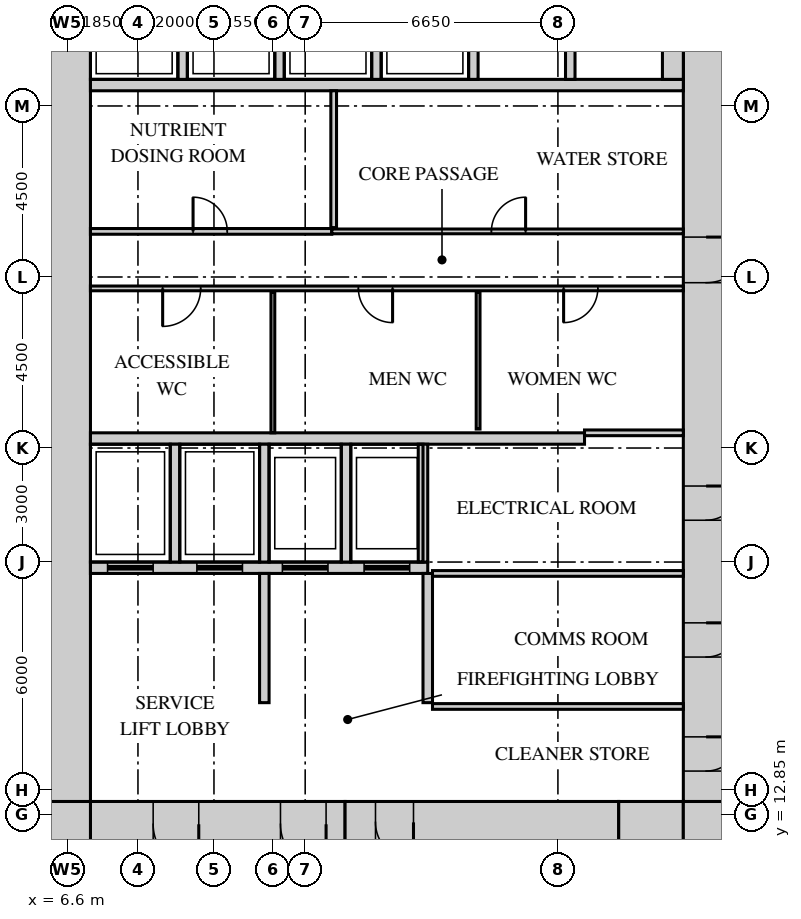
"""IFC4 building model, lengths in metres.
Left out: names, types, materials, properties, quantities, classifications, styles, units other than length and angle.
Written with IfcOpenShell. Run it as: python <this file> out.ifc"""

import sys

from ifc_helpers import new_model, si_unit, direction, frame, frame_2d, origin, place, context, subcontext, project, spatial, rectangle, extrude, source, transform, mapped, element, fill, save


model = new_model("IFC4")
c1 = context("Model", 3, precision=1e-05, world=origin(), true_north=direction((0.0, 1.0)))
c2 = subcontext(c1, "Body", "Model", "MODEL_VIEW")
j1 = project(units=[si_unit("LENGTHUNIT", "METRE"), si_unit("PLANEANGLEUNIT", "RADIAN")], contexts=[c1])
p1 = place(None, origin())
s1 = spatial("IfcSite", under=j1, at=p1, CompositionType="ELEMENT")
p2 = place(p1, origin())
s2 = spatial("IfcBuilding", under=s1, at=p2, CompositionType="ELEMENT")
p3 = place(p2, frame((0.0, 0.0, 28.5)))
s3 = spatial("IfcBuildingStorey", under=s2, at=p3, CompositionType="ELEMENT", Elevation=28.5)
m1 = source(origin(), c2, "Body", "SweptSolid", [
    extrude(rectangle(XDim=6.7, YDim=1.2, at=frame_2d((3.35, 0.0))), origin(), (0.0, 0.0, 1.0), 4.0),
])
p4 = place(p3, frame((7.2, 12.6, 0.0), z_axis=(0.0, 0.0, 1.0), x_axis=(1.0, 0.0, 0.0)))
e1 = element("IfcWall", 1, at=p4, inside=s3, PredefinedType="SHEAR", context=c2, shape_type="MappedRepresentation", body=[
    mapped(m1, transform((0.0, 0.0, 0.0))),
])
m2 = source(origin(), c2, "Body", "SweptSolid", [
    extrude(rectangle(XDim=1.2, YDim=2.1, at=frame_2d((0.6, 1.05))), frame((0.0, 0.61, 0.0), z_axis=(0.0, -1.0, 0.0), x_axis=(1.0, 0.0, 0.0)), (0.0, 0.0, 1.0), 1.22),
])
p5 = place(p4, frame((5.0, 0.0, 0.0)))
e2 = element("IfcOpeningElement", 2, at=p5, cuts=e1, PredefinedType="OPENING", context=c2, shape_type="MappedRepresentation", body=[
    mapped(m2, transform((0.0, 0.0, 0.0))),
])
p6 = place(p4, frame((1.65, 0.0, 0.0)))
e3 = element("IfcOpeningElement", 3, at=p6, cuts=e1, PredefinedType="OPENING", context=c2, shape_type="MappedRepresentation", body=[
    mapped(m2, transform((0.0, 0.0, 0.0))),
])
m3 = source(origin(), c2, "Body", "SweptSolid", [
    extrude(rectangle(XDim=7.2, YDim=1.1, at=frame_2d((3.6, 0.0))), origin(), (0.0, 0.0, 1.0), 4.0),
])
p7 = place(p3, frame((13.9, 12.65, 0.0), z_axis=(0.0, 0.0, 1.0), x_axis=(1.0, 0.0, 0.0)))
e4 = element("IfcWall", 4, at=p7, inside=s3, PredefinedType="SHEAR", context=c2, shape_type="MappedRepresentation", body=[
    mapped(m3, transform((0.0, 0.0, 0.0))),
])
m4 = source(origin(), c2, "Body", "SweptSolid", [
    extrude(rectangle(XDim=1.0, YDim=2.1, at=frame_2d((0.5, 1.05))), frame((0.0, 0.56, 0.0), z_axis=(0.0, -1.0, 0.0), x_axis=(1.0, 0.0, 0.0)), (0.0, 0.0, 1.0), 1.12),
])
p8 = place(p7, frame((0.8, 0.0, 0.0)))
e5 = element("IfcOpeningElement", 5, at=p8, cuts=e4, PredefinedType="OPENING", context=c2, shape_type="MappedRepresentation", body=[
    mapped(m4, transform((0.0, 0.0, 0.0))),
])
m5 = source(origin(), c2, "Body", "SweptSolid", [
    extrude(rectangle(XDim=1.7, YDim=1.2, at=frame_2d((0.85, 0.0))), origin(), (0.0, 0.0, 1.0), 4.0),
])
p9 = place(p3, frame((21.1, 12.6, 0.0), z_axis=(0.0, 0.0, 1.0), x_axis=(1.0, 0.0, 0.0)))
e6 = element("IfcWall", 6, at=p9, inside=s3, PredefinedType="SHEAR", context=c2, shape_type="MappedRepresentation", body=[
    mapped(m5, transform((0.0, 0.0, 0.0))),
])
m6 = source(origin(), c2, "Body", "SweptSolid", [
    extrude(rectangle(XDim=1.2, YDim=1.2, at=frame_2d((0.6, 0.0))), origin(), (0.0, 0.0, 1.0), 4.0),
])
for number, where, z_axis, x_axis in (
    (7, (22.8, 12.6, 0.0), (0.0, 0.0, 1.0), (1.0, 0.0, 0.0)),
    (8, (6.0, 12.6, 0.0), (0.0, 0.0, 1.0), (1.0, 0.0, 0.0)),
):
    element("IfcWall", number, at=place(p3, frame(where, z_axis=z_axis, x_axis=x_axis)), inside=s3, PredefinedType="SHEAR", context=c2, shape_type="MappedRepresentation", body=[
        mapped(m6, transform((0.0, 0.0, 0.0))),
    ])
m7 = source(origin(), c2, "Body", "SweptSolid", [
    extrude(rectangle(XDim=27.6, YDim=1.2, at=frame_2d((13.8, 0.0))), origin(), (0.0, 0.0, 1.0), 4.0),
])
p10 = place(p3, frame((23.4, 13.2, 0.0), z_axis=(0.0, 0.0, 1.0), x_axis=(0.0, 1.0, 0.0)))
e9 = element("IfcWall", 9, at=p10, inside=s3, PredefinedType="SHEAR", context=c2, shape_type="MappedRepresentation", body=[
    mapped(m7, transform((0.0, 0.0, 0.0))),
])
m8 = source(origin(), c2, "Body", "SweptSolid", [
    extrude(rectangle(XDim=1.8, YDim=2.1, at=frame_2d((0.9, 1.05))), frame((0.0, 0.61, 0.0), z_axis=(0.0, -1.0, 0.0), x_axis=(1.0, 0.0, 0.0)), (0.0, 0.0, 1.0), 1.22),
])
p11 = place(p10, frame((22.4, 0.0, 0.0)))
e10 = element("IfcOpeningElement", 10, at=p11, cuts=e9, PredefinedType="OPENING", context=c2, shape_type="MappedRepresentation", body=[
    mapped(m8, transform((0.0, 0.0, 0.0))),
])
p12 = place(p10, frame((13.65, 0.0, 0.0)))
e11 = element("IfcOpeningElement", 11, at=p12, cuts=e9, PredefinedType="OPENING", context=c2, shape_type="MappedRepresentation", body=[
    mapped(m2, transform((0.0, 0.0, 0.0))),
])
m9 = source(origin(), c2, "Body", "SweptSolid", [
    extrude(rectangle(XDim=0.9, YDim=2.1, at=frame_2d((0.45, 1.05))), frame((0.0, 0.61, 0.0), z_axis=(0.0, -1.0, 0.0), x_axis=(1.0, 0.0, 0.0)), (0.0, 0.0, 1.0), 1.22),
])
p13 = place(p10, frame((0.8, 0.0, 0.0)))
e12 = element("IfcOpeningElement", 12, at=p13, cuts=e9, PredefinedType="OPENING", context=c2, shape_type="MappedRepresentation", body=[
    mapped(m9, transform((0.0, 0.0, 0.0))),
])
p14 = place(p10, frame((3.8, 0.0, 0.0)))
e13 = element("IfcOpeningElement", 13, at=p14, cuts=e9, PredefinedType="OPENING", context=c2, shape_type="MappedRepresentation", body=[
    mapped(m9, transform((0.0, 0.0, 0.0))),
])
p15 = place(p10, frame((7.4, 0.0, 0.0)))
e14 = element("IfcOpeningElement", 14, at=p15, cuts=e9, PredefinedType="OPENING", context=c2, shape_type="MappedRepresentation", body=[
    mapped(m9, transform((0.0, 0.0, 0.0))),
])
p16 = place(p3, frame((6.6, 13.2, 0.0), z_axis=(0.0, 0.0, 1.0), x_axis=(0.0, 1.0, 0.0)))
e15 = element("IfcWall", 15, at=p16, inside=s3, PredefinedType="SHEAR", context=c2, shape_type="MappedRepresentation", body=[
    mapped(m7, transform((0.0, 0.0, 0.0))),
])
m10 = source(origin(), c2, "Body", "SweptSolid", [
    extrude(rectangle(XDim=13.0, YDim=0.3, at=frame_2d((6.5, 0.0))), origin(), (0.0, 0.0, 1.0), 4.0),
])
p17 = place(p3, frame((7.2, 22.75, 0.0), z_axis=(0.0, 0.0, 1.0), x_axis=(1.0, 0.0, 0.0)))
e16 = element("IfcWall", 16, at=p17, inside=s3, PredefinedType="STANDARD", context=c2, shape_type="MappedRepresentation", body=[
    mapped(m10, transform((0.0, 0.0, 0.0))),
])
m11 = source(origin(), c2, "Body", "SweptSolid", [
    extrude(rectangle(XDim=8.875, YDim=0.3, at=frame_2d((4.438, 0.0))), origin(), (0.0, 0.0, 1.0), 4.0),
])
p18 = place(p3, frame((7.2, 19.35, 0.0), z_axis=(0.0, 0.0, 1.0), x_axis=(1.0, 0.0, 0.0)))
e17 = element("IfcWall", 17, at=p18, inside=s3, PredefinedType="STANDARD", context=c2, shape_type="MappedRepresentation", body=[
    mapped(m11, transform((0.0, 0.0, 0.0))),
])
m12 = source(origin(), c2, "Body", "SweptSolid", [
    extrude(rectangle(XDim=1.2, YDim=2.1, at=frame_2d((0.6, 1.05))), frame((0.0, 0.16, 0.0), z_axis=(0.0, -1.0, 0.0), x_axis=(1.0, 0.0, 0.0)), (0.0, 0.0, 1.0), 0.32),
])
p19 = place(p18, frame((0.45, 0.0, 0.0)))
e18 = element("IfcOpeningElement", 18, at=p19, cuts=e17, PredefinedType="OPENING", context=c2, shape_type="MappedRepresentation", body=[
    mapped(m12, transform((0.0, 0.0, 0.0))),
])
p20 = place(p18, frame((2.8, 0.0, 0.0)))
e19 = element("IfcOpeningElement", 19, at=p20, cuts=e17, PredefinedType="OPENING", context=c2, shape_type="MappedRepresentation", body=[
    mapped(m12, transform((0.0, 0.0, 0.0))),
])
p21 = place(p18, frame((5.05, 0.0, 0.0)))
e20 = element("IfcOpeningElement", 20, at=p21, cuts=e17, PredefinedType="OPENING", context=c2, shape_type="MappedRepresentation", body=[
    mapped(m12, transform((0.0, 0.0, 0.0))),
])
p22 = place(p18, frame((7.2, 0.0, 0.0)))
e21 = element("IfcOpeningElement", 21, at=p22, cuts=e17, PredefinedType="OPENING", context=c2, shape_type="MappedRepresentation", body=[
    mapped(m12, transform((0.0, 0.0, 0.0))),
])
m13 = source(origin(), c2, "Body", "SweptSolid", [
    extrude(rectangle(XDim=15.6, YDim=0.3, at=frame_2d((7.8, 0.0))), origin(), (0.0, 0.0, 1.0), 4.0),
])
p23 = place(p3, frame((7.2, 32.05, 0.0), z_axis=(0.0, 0.0, 1.0), x_axis=(1.0, 0.0, 0.0)))
e22 = element("IfcWall", 22, at=p23, inside=s3, PredefinedType="STANDARD", context=c2, shape_type="MappedRepresentation", body=[
    mapped(m13, transform((0.0, 0.0, 0.0))),
])
m14 = source(origin(), c2, "Body", "SweptSolid", [
    extrude(rectangle(XDim=3.1, YDim=0.25, at=frame_2d((1.55, 0.0))), origin(), (0.0, 0.0, 1.0), 4.0),
])
for number, where, z_axis, x_axis in (
    (23, (9.425, 19.5, 0.0), (0.0, 0.0, 1.0), (0.0, 1.0, 0.0)),
    (24, (11.775, 19.5, 0.0), (0.0, 0.0, 1.0), (0.0, 1.0, 0.0)),
    (25, (13.925, 19.5, 0.0), (0.0, 0.0, 1.0), (0.0, 1.0, 0.0)),
    (26, (15.95, 19.5, 0.0), (0.0, 0.0, 1.0), (0.0, 1.0, 0.0)),
):
    element("IfcWall", number, at=place(p3, frame(where, z_axis=z_axis, x_axis=x_axis)), inside=s3, PredefinedType="STANDARD", context=c2, shape_type="MappedRepresentation", body=[
        mapped(m14, transform((0.0, 0.0, 0.0))),
    ])
m15 = source(origin(), c2, "Body", "SweptSolid", [
    extrude(rectangle(XDim=2.4, YDim=0.25, at=frame_2d((1.2, 0.0))), origin(), (0.0, 0.0, 1.0), 4.0),
])
for number, where, z_axis, x_axis in (
    (27, (9.625, 32.2, 0.0), (0.0, 0.0, 1.0), (0.0, 1.0, 0.0)),
    (28, (12.175, 32.2, 0.0), (0.0, 0.0, 1.0), (0.0, 1.0, 0.0)),
    (29, (14.725, 32.2, 0.0), (0.0, 0.0, 1.0), (0.0, 1.0, 0.0)),
    (30, (17.275, 32.2, 0.0), (0.0, 0.0, 1.0), (0.0, 1.0, 0.0)),
    (31, (19.825, 32.2, 0.0), (0.0, 0.0, 1.0), (0.0, 1.0, 0.0)),
):
    element("IfcWall", number, at=place(p3, frame(where, z_axis=z_axis, x_axis=x_axis)), inside=s3, PredefinedType="STANDARD", context=c2, shape_type="MappedRepresentation", body=[
        mapped(m15, transform((0.0, 0.0, 0.0))),
    ])
m16 = source(origin(), c2, "Body", "SweptSolid", [
    extrude(rectangle(XDim=2.4, YDim=0.55, at=frame_2d((1.2, 0.0))), origin(), (0.0, 0.0, 1.0), 4.0),
])
p24 = place(p3, frame((22.525, 32.2, 0.0), z_axis=(0.0, 0.0, 1.0), x_axis=(0.0, 1.0, 0.0)))
e32 = element("IfcWall", 32, at=p24, inside=s3, PredefinedType="STANDARD", context=c2, shape_type="MappedRepresentation", body=[
    mapped(m16, transform((0.0, 0.0, 0.0))),
])
m17 = source(origin(), c2, "Body", "SweptSolid", [
    extrude(rectangle(XDim=3.4, YDim=0.25, at=frame_2d((1.7, 0.0))), origin(), (0.0, 0.0, 1.0), 4.0),
])
for number, where, z_axis, x_axis in (
    (33, (16.075, 15.8, 0.0), (0.0, 0.0, 1.0), (0.0, 1.0, 0.0)),
    (34, (11.775, 15.8, 0.0), (0.0, 0.0, 1.0), (0.0, 1.0, 0.0)),
):
    element("IfcWall", number, at=place(p3, frame(where, z_axis=z_axis, x_axis=x_axis)), inside=s3, PredefinedType="STANDARD", context=c2, shape_type="MappedRepresentation", body=[
        mapped(m17, transform((0.0, 0.0, 0.0))),
    ])
m18 = source(origin(), c2, "Body", "SweptSolid", [
    extrude(rectangle(XDim=6.6, YDim=0.15, at=frame_2d((3.3, 0.0))), origin(), (0.0, 0.0, 1.0), 4.0),
])
for number, where, z_axis, x_axis in (
    (35, (16.2, 15.7, 0.0), (0.0, 0.0, 1.0), (1.0, 0.0, 0.0)),
    (36, (16.2, 19.2, 0.0), (0.0, 0.0, 1.0), (1.0, 0.0, 0.0)),
):
    element("IfcWall", number, at=place(p3, frame(where, z_axis=z_axis, x_axis=x_axis)), inside=s3, PredefinedType="PARTITIONING", context=c2, shape_type="MappedRepresentation", body=[
        mapped(m18, transform((0.0, 0.0, 0.0))),
    ])
m19 = source(origin(), c2, "Body", "SweptSolid", [
    extrude(rectangle(XDim=3.7, YDim=0.1, at=frame_2d((1.85, 0.0))), origin(), (0.0, 0.0, 1.0), 4.0),
])
p25 = place(p3, frame((12.0, 22.9, 0.0), z_axis=(0.0, 0.0, 1.0), x_axis=(0.0, 1.0, 0.0)))
e37 = element("IfcWall", 37, at=p25, inside=s3, PredefinedType="PARTITIONING", context=c2, shape_type="MappedRepresentation", body=[
    mapped(m19, transform((0.0, 0.0, 0.0))),
])
m20 = source(origin(), c2, "Body", "SweptSolid", [
    extrude(rectangle(XDim=2.6, YDim=0.15, at=frame_2d((1.3, 0.0))), origin(), (0.0, 0.0, 1.0), 4.0),
])
p26 = place(p3, frame((20.2, 22.9, 0.0), z_axis=(0.0, 0.0, 1.0), x_axis=(1.0, 0.0, 0.0)))
e38 = element("IfcWall", 38, at=p26, inside=s3, PredefinedType="PARTITIONING", context=c2, shape_type="MappedRepresentation", body=[
    mapped(m20, transform((0.0, 0.0, 0.0))),
])
m21 = source(origin(), c2, "Body", "SweptSolid", [
    extrude(rectangle(XDim=3.6, YDim=0.1, at=frame_2d((1.8, 0.0))), origin(), (0.0, 0.0, 1.0), 4.0),
])
p27 = place(p3, frame((17.4, 23.0, 0.0), z_axis=(0.0, 0.0, 1.0), x_axis=(0.0, 1.0, 0.0)))
e39 = element("IfcWall", 39, at=p27, inside=s3, PredefinedType="PARTITIONING", context=c2, shape_type="MappedRepresentation", body=[
    mapped(m21, transform((0.0, 0.0, 0.0))),
])
m22 = source(origin(), c2, "Body", "SweptSolid", [
    extrude(rectangle(XDim=15.6, YDim=0.125, at=frame_2d((7.8, 0.0))), origin(), (0.0, 0.0, 1.0), 4.0),
])
p28 = place(p3, frame((7.2, 26.7, 0.0), z_axis=(0.0, 0.0, 1.0), x_axis=(1.0, 0.0, 0.0)))
e40 = element("IfcWall", 40, at=p28, inside=s3, PredefinedType="PARTITIONING", context=c2, shape_type="MappedRepresentation", body=[
    mapped(m22, transform((0.0, 0.0, 0.0))),
])
m23 = source(origin(), c2, "Body", "SweptSolid", [
    extrude(rectangle(XDim=1.0, YDim=2.1, at=frame_2d((0.5, 1.05))), frame((0.0, 0.073, 0.0), z_axis=(0.0, -1.0, 0.0), x_axis=(1.0, 0.0, 0.0)), (0.0, 0.0, 1.0), 0.145),
])
p29 = place(p28, frame((1.9, 0.0, 0.0)))
e41 = element("IfcOpeningElement", 41, at=p29, cuts=e40, PredefinedType="OPENING", context=c2, shape_type="MappedRepresentation", body=[
    mapped(m23, transform((0.0, 0.0, 0.0))),
])
m24 = source(origin(), c2, "Body", "SweptSolid", [
    extrude(rectangle(XDim=0.9, YDim=2.1, at=frame_2d((0.45, 1.05))), frame((0.0, 0.073, 0.0), z_axis=(0.0, -1.0, 0.0), x_axis=(1.0, 0.0, 0.0)), (0.0, 0.0, 1.0), 0.145),
])
p30 = place(p28, frame((7.05, 0.0, 0.0)))
e42 = element("IfcOpeningElement", 42, at=p30, cuts=e40, PredefinedType="OPENING", context=c2, shape_type="MappedRepresentation", body=[
    mapped(m24, transform((0.0, 0.0, 0.0))),
])
p31 = place(p28, frame((12.45, 0.0, 0.0)))
e43 = element("IfcOpeningElement", 43, at=p31, cuts=e40, PredefinedType="OPENING", context=c2, shape_type="MappedRepresentation", body=[
    mapped(m24, transform((0.0, 0.0, 0.0))),
])
m25 = source(origin(), c2, "Body", "SweptSolid", [
    extrude(rectangle(XDim=6.35, YDim=0.15, at=frame_2d((3.175, 0.0))), origin(), (0.0, 0.0, 1.0), 4.0),
])
p32 = place(p3, frame((7.2, 28.2, 0.0), z_axis=(0.0, 0.0, 1.0), x_axis=(1.0, 0.0, 0.0)))
e44 = element("IfcWall", 44, at=p32, inside=s3, PredefinedType="PARTITIONING", context=c2, shape_type="MappedRepresentation", body=[
    mapped(m25, transform((0.0, 0.0, 0.0))),
])
m26 = source(origin(), c2, "Body", "SweptSolid", [
    extrude(rectangle(XDim=0.9, YDim=2.1, at=frame_2d((0.45, 1.05))), frame((0.0, 0.085, 0.0), z_axis=(0.0, -1.0, 0.0), x_axis=(1.0, 0.0, 0.0)), (0.0, 0.0, 1.0), 0.17),
])
p33 = place(p32, frame((2.7, 0.0, 0.0)))
e45 = element("IfcOpeningElement", 45, at=p33, cuts=e44, PredefinedType="OPENING", context=c2, shape_type="MappedRepresentation", body=[
    mapped(m26, transform((0.0, 0.0, 0.0))),
])
m27 = source(origin(), c2, "Body", "SweptSolid", [
    extrude(rectangle(XDim=9.25, YDim=0.125, at=frame_2d((4.625, 0.0))), origin(), (0.0, 0.0, 1.0), 4.0),
])
p34 = place(p3, frame((13.55, 28.2, 0.0), z_axis=(0.0, 0.0, 1.0), x_axis=(1.0, 0.0, 0.0)))
e46 = element("IfcWall", 46, at=p34, inside=s3, PredefinedType="PARTITIONING", context=c2, shape_type="MappedRepresentation", body=[
    mapped(m27, transform((0.0, 0.0, 0.0))),
])
p35 = place(p34, frame((4.2, 0.0, 0.0)))
e47 = element("IfcOpeningElement", 47, at=p35, cuts=e46, PredefinedType="OPENING", context=c2, shape_type="MappedRepresentation", body=[
    mapped(m24, transform((0.0, 0.0, 0.0))),
])
m28 = source(origin(), c2, "Body", "SweptSolid", [
    extrude(rectangle(XDim=3.6, YDim=0.15, at=frame_2d((1.8, 0.0))), origin(), (0.0, 0.0, 1.0), 4.0),
])
p36 = place(p3, frame((13.6, 28.3, 0.0), z_axis=(0.0, 0.0, 1.0), x_axis=(0.0, 1.0, 0.0)))
e48 = element("IfcWall", 48, at=p36, inside=s3, PredefinedType="PARTITIONING", context=c2, shape_type="MappedRepresentation", body=[
    mapped(m28, transform((0.0, 0.0, 0.0))),
])
m29 = source(origin(), c2, "Body", "SweptSolid", [
    extrude(rectangle(XDim=1.2, YDim=2.1, at=frame_2d((0.6, 1.05))), frame((0.0, 0.55, 0.0), z_axis=(0.0, -1.0, 0.0), x_axis=(1.0, 0.0, 0.0)), (0.0, 0.0, 1.0), 1.1),
])
p37 = place(p12, origin())
e49 = element("IfcDoor", 49, at=p37, inside=s3, OperationType="SINGLE_SWING_RIGHT", PredefinedType="DOOR", context=c2, shape_type="MappedRepresentation", body=[
    mapped(m29, transform((0.0, 0.0, 0.0))),
])
fill(e11, e49)
m30 = source(origin(), c2, "Body", "SweptSolid", [
    extrude(rectangle(XDim=0.9, YDim=2.1, at=frame_2d((0.45, 1.05))), frame((0.0, 0.025, 0.0), z_axis=(0.0, -1.0, 0.0), x_axis=(1.0, 0.0, 0.0)), (0.0, 0.0, 1.0), 0.05),
])
p38 = place(p33, origin())
e50 = element("IfcDoor", 50, at=p38, inside=s3, OperationType="SINGLE_SWING_RIGHT", PredefinedType="DOOR", context=c2, shape_type="MappedRepresentation", body=[
    mapped(m30, transform((0.0, 0.0, 0.0))),
])
fill(e45, e50)
p39 = place(p35, origin())
e51 = element("IfcDoor", 51, at=p39, inside=s3, OperationType="SINGLE_SWING_LEFT", PredefinedType="DOOR", context=c2, shape_type="MappedRepresentation", body=[
    mapped(m30, transform((0.0, 0.0, 0.0))),
])
fill(e47, e51)
m31 = source(origin(), c2, "Body", "SweptSolid", [
    extrude(rectangle(XDim=1.0, YDim=2.1, at=frame_2d((0.5, 1.05))), frame((0.0, 0.025, 0.0), z_axis=(0.0, -1.0, 0.0), x_axis=(1.0, 0.0, 0.0)), (0.0, 0.0, 1.0), 0.05),
])
p40 = place(p29, origin())
e52 = element("IfcDoor", 52, at=p40, inside=s3, OperationType="SINGLE_SWING_LEFT", PredefinedType="DOOR", context=c2, shape_type="MappedRepresentation", body=[
    mapped(m31, transform((0.0, 0.0, 0.0))),
])
fill(e41, e52)
p41 = place(p30, origin())
e53 = element("IfcDoor", 53, at=p41, inside=s3, OperationType="SINGLE_SWING_RIGHT", PredefinedType="DOOR", context=c2, shape_type="MappedRepresentation", body=[
    mapped(m30, transform((0.0, 0.0, 0.0))),
])
fill(e42, e53)
p42 = place(p31, origin())
e54 = element("IfcDoor", 54, at=p42, inside=s3, OperationType="SINGLE_SWING_LEFT", PredefinedType="DOOR", context=c2, shape_type="MappedRepresentation", body=[
    mapped(m30, transform((0.0, 0.0, 0.0))),
])
fill(e43, e54)
m32 = source(origin(), c2, "Body", "SweptSolid", [
    extrude(rectangle(XDim=0.9, YDim=2.1, at=frame_2d((0.45, 1.05))), frame((0.0, 0.55, 0.0), z_axis=(0.0, -1.0, 0.0), x_axis=(1.0, 0.0, 0.0)), (0.0, 0.0, 1.0), 1.1),
])
p43 = place(p13, origin())
e55 = element("IfcDoor", 55, at=p43, inside=s3, OperationType="SINGLE_SWING_RIGHT", PredefinedType="DOOR", context=c2, shape_type="MappedRepresentation", body=[
    mapped(m32, transform((0.0, 0.0, 0.0))),
])
fill(e12, e55)
p44 = place(p14, origin())
e56 = element("IfcDoor", 56, at=p44, inside=s3, OperationType="SINGLE_SWING_RIGHT", PredefinedType="DOOR", context=c2, shape_type="MappedRepresentation", body=[
    mapped(m32, transform((0.0, 0.0, 0.0))),
])
fill(e13, e56)
p45 = place(p15, origin())
e57 = element("IfcDoor", 57, at=p45, inside=s3, OperationType="SINGLE_SWING_RIGHT", PredefinedType="DOOR", context=c2, shape_type="MappedRepresentation", body=[
    mapped(m32, transform((0.0, 0.0, 0.0))),
])
fill(e14, e57)
p46 = place(p5, origin())
e58 = element("IfcDoor", 58, at=p46, inside=s3, OperationType="SINGLE_SWING_RIGHT", PredefinedType="DOOR", context=c2, shape_type="MappedRepresentation", body=[
    mapped(m29, transform((0.0, 0.0, 0.0))),
])
fill(e2, e58)
p47 = place(p6, origin())
e59 = element("IfcDoor", 59, at=p47, inside=s3, OperationType="SINGLE_SWING_RIGHT", PredefinedType="DOOR", context=c2, shape_type="MappedRepresentation", body=[
    mapped(m29, transform((0.0, 0.0, 0.0))),
])
fill(e3, e59)
m33 = source(origin(), c2, "Body", "SweptSolid", [
    extrude(rectangle(XDim=1.0, YDim=2.1, at=frame_2d((0.5, 1.05))), frame((0.0, 0.5, 0.0), z_axis=(0.0, -1.0, 0.0), x_axis=(1.0, 0.0, 0.0)), (0.0, 0.0, 1.0), 1.0),
])
p48 = place(p8, origin())
e60 = element("IfcDoor", 60, at=p48, inside=s3, OperationType="SINGLE_SWING_RIGHT", PredefinedType="DOOR", context=c2, shape_type="MappedRepresentation", body=[
    mapped(m33, transform((0.0, 0.0, 0.0))),
])
fill(e5, e60)
m34 = source(origin(), c2, "Body", "SweptSolid", [
    extrude(rectangle(XDim=1.2, YDim=2.1, at=frame_2d((0.6, 1.05))), frame((0.0, 0.025, 0.0), z_axis=(0.0, -1.0, 0.0), x_axis=(1.0, 0.0, 0.0)), (0.0, 0.0, 1.0), 0.05),
])
p49 = place(p19, origin())
e61 = element("IfcDoor", 61, at=p49, inside=s3, OperationType="DOUBLE_DOOR_SLIDING", PredefinedType="DOOR", context=c2, shape_type="MappedRepresentation", body=[
    mapped(m34, transform((0.0, 0.0, 0.0))),
])
fill(e18, e61)
p50 = place(p20, origin())
e62 = element("IfcDoor", 62, at=p50, inside=s3, OperationType="DOUBLE_DOOR_SLIDING", PredefinedType="DOOR", context=c2, shape_type="MappedRepresentation", body=[
    mapped(m34, transform((0.0, 0.0, 0.0))),
])
fill(e19, e62)
p51 = place(p21, origin())
e63 = element("IfcDoor", 63, at=p51, inside=s3, OperationType="DOUBLE_DOOR_SLIDING", PredefinedType="DOOR", context=c2, shape_type="MappedRepresentation", body=[
    mapped(m34, transform((0.0, 0.0, 0.0))),
])
fill(e20, e63)
p52 = place(p22, origin())
e64 = element("IfcDoor", 64, at=p52, inside=s3, OperationType="DOUBLE_DOOR_SLIDING", PredefinedType="DOOR", context=c2, shape_type="MappedRepresentation", body=[
    mapped(m34, transform((0.0, 0.0, 0.0))),
])
fill(e21, e64)
save(model, sys.argv[1])
